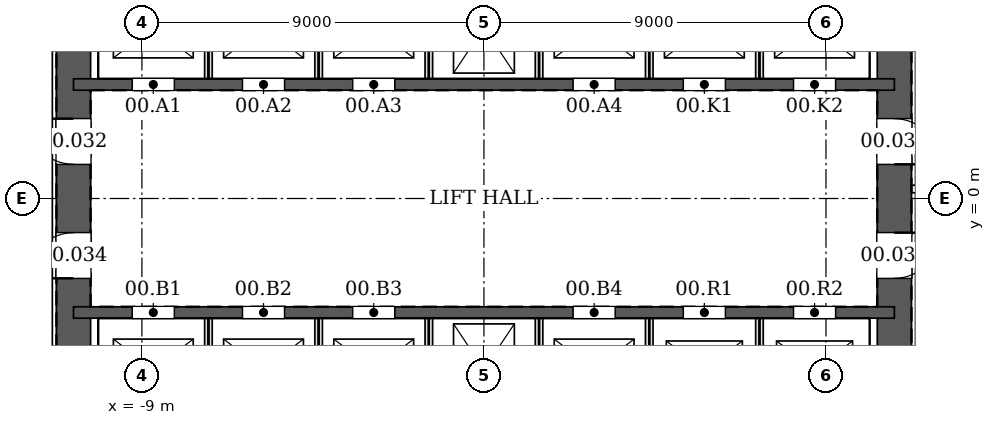
"""IFC4 building model, lengths in metres.
Left out: names, types, materials, properties, quantities, classifications, styles, units other than length and angle.
Written with IfcOpenShell. Run it as: python <this file> out.ifc"""

import sys

from ifc_helpers import new_model, si_unit, direction, frame, frame_2d, origin, place, context, subcontext, project, spatial, rectangle, extrude, element, fill, save


model = new_model("IFC4")
c1 = context("Model", 3, precision=1e-05, world=origin(), true_north=direction((0.0, 1.0)))
c2 = subcontext(c1, "Body", "Model", "MODEL_VIEW")
j1 = project(units=[si_unit("LENGTHUNIT", "METRE"), si_unit("PLANEANGLEUNIT", "RADIAN")], contexts=[c1])
p1 = place(None, origin())
s1 = spatial("IfcSite", under=j1, at=p1, CompositionType="ELEMENT")
p2 = place(p1, origin())
s2 = spatial("IfcBuilding", under=s1, at=p2, CompositionType="ELEMENT")
p3 = place(p2, origin())
s3 = spatial("IfcBuildingStorey", under=s2, at=p3, CompositionType="ELEMENT", Elevation=0.0)
p4 = place(p3, frame((10.8, -10.8, 0.0), z_axis=(0.0, 0.0, 1.0), x_axis=(0.0, 1.0, 0.0)))
e1 = element("IfcWall", 1, at=p4, inside=s3, PredefinedType="SOLIDWALL", context=c2, shape_type="SweptSolid", body=[
    extrude(rectangle(XDim=21.6, YDim=0.9, at=frame_2d((10.8, 0.0))), origin(), (0.0, 0.0, 1.0), 7.2),
])
p5 = place(p4, frame((11.7, 0.0, 0.0)))
e2 = element("IfcOpeningElement", 2, at=p5, cuts=e1, PredefinedType="OPENING", context=c2, shape_type="SweptSolid", body=[
    extrude(rectangle(XDim=1.2, YDim=2.1, at=frame_2d((0.6, 1.05))), frame((0.0, 0.46, 0.0), z_axis=(0.0, -1.0, 0.0), x_axis=(1.0, 0.0, 0.0)), (0.0, 0.0, 1.0), 0.92),
])
p6 = place(p4, frame((8.7, 0.0, 0.0)))
e3 = element("IfcOpeningElement", 3, at=p6, cuts=e1, PredefinedType="OPENING", context=c2, shape_type="SweptSolid", body=[
    extrude(rectangle(XDim=1.2, YDim=2.1, at=frame_2d((0.6, 1.05))), frame((0.0, 0.46, 0.0), z_axis=(0.0, -1.0, 0.0), x_axis=(1.0, 0.0, 0.0)), (0.0, 0.0, 1.0), 0.92),
])
p7 = place(p3, frame((-10.8, 10.8, 0.0), z_axis=(0.0, 0.0, 1.0), x_axis=(0.0, -1.0, 0.0)))
e4 = element("IfcWall", 4, at=p7, inside=s3, PredefinedType="SOLIDWALL", context=c2, shape_type="SweptSolid", body=[
    extrude(rectangle(XDim=21.6, YDim=0.9, at=frame_2d((10.8, 0.0))), origin(), (0.0, 0.0, 1.0), 7.2),
])
p8 = place(p7, frame((8.7, 0.0, 0.0)))
e5 = element("IfcOpeningElement", 5, at=p8, cuts=e4, PredefinedType="OPENING", context=c2, shape_type="SweptSolid", body=[
    extrude(rectangle(XDim=1.2, YDim=2.1, at=frame_2d((0.6, 1.05))), frame((0.0, 0.46, 0.0), z_axis=(0.0, -1.0, 0.0), x_axis=(1.0, 0.0, 0.0)), (0.0, 0.0, 1.0), 0.92),
])
p9 = place(p7, frame((11.7, 0.0, 0.0)))
e6 = element("IfcOpeningElement", 6, at=p9, cuts=e4, PredefinedType="OPENING", context=c2, shape_type="SweptSolid", body=[
    extrude(rectangle(XDim=1.2, YDim=2.1, at=frame_2d((0.6, 1.05))), frame((0.0, 0.46, 0.0), z_axis=(0.0, -1.0, 0.0), x_axis=(1.0, 0.0, 0.0)), (0.0, 0.0, 1.0), 0.92),
])
p10 = place(p3, frame((-10.8, 3.0, 0.0), z_axis=(0.0, 0.0, 1.0), x_axis=(1.0, 0.0, 0.0)))
e7 = element("IfcWall", 7, at=p10, inside=s3, PredefinedType="SOLIDWALL", context=c2, shape_type="SweptSolid", body=[
    extrude(rectangle(XDim=21.6, YDim=0.3, at=frame_2d((10.8, 0.0))), origin(), (0.0, 0.0, 1.0), 7.2),
])
p11 = place(p10, frame((1.55, 0.0, 0.0)))
e8 = element("IfcOpeningElement", 8, at=p11, cuts=e7, PredefinedType="OPENING", context=c2, shape_type="SweptSolid", body=[
    extrude(rectangle(XDim=1.1, YDim=2.1, at=frame_2d((0.55, 1.05))), frame((0.0, 0.16, 0.0), z_axis=(0.0, -1.0, 0.0), x_axis=(1.0, 0.0, 0.0)), (0.0, 0.0, 1.0), 0.32),
])
p12 = place(p10, frame((4.45, 0.0, 0.0)))
e9 = element("IfcOpeningElement", 9, at=p12, cuts=e7, PredefinedType="OPENING", context=c2, shape_type="SweptSolid", body=[
    extrude(rectangle(XDim=1.1, YDim=2.1, at=frame_2d((0.55, 1.05))), frame((0.0, 0.16, 0.0), z_axis=(0.0, -1.0, 0.0), x_axis=(1.0, 0.0, 0.0)), (0.0, 0.0, 1.0), 0.32),
])
p13 = place(p10, frame((7.35, 0.0, 0.0)))
e10 = element("IfcOpeningElement", 10, at=p13, cuts=e7, PredefinedType="OPENING", context=c2, shape_type="SweptSolid", body=[
    extrude(rectangle(XDim=1.1, YDim=2.1, at=frame_2d((0.55, 1.05))), frame((0.0, 0.16, 0.0), z_axis=(0.0, -1.0, 0.0), x_axis=(1.0, 0.0, 0.0)), (0.0, 0.0, 1.0), 0.32),
])
p14 = place(p10, frame((13.15, 0.0, 0.0)))
e11 = element("IfcOpeningElement", 11, at=p14, cuts=e7, PredefinedType="OPENING", context=c2, shape_type="SweptSolid", body=[
    extrude(rectangle(XDim=1.1, YDim=2.1, at=frame_2d((0.55, 1.05))), frame((0.0, 0.16, 0.0), z_axis=(0.0, -1.0, 0.0), x_axis=(1.0, 0.0, 0.0)), (0.0, 0.0, 1.0), 0.32),
])
p15 = place(p10, frame((16.05, 0.0, 0.0)))
e12 = element("IfcOpeningElement", 12, at=p15, cuts=e7, PredefinedType="OPENING", context=c2, shape_type="SweptSolid", body=[
    extrude(rectangle(XDim=1.1, YDim=2.1, at=frame_2d((0.55, 1.05))), frame((0.0, 0.16, 0.0), z_axis=(0.0, -1.0, 0.0), x_axis=(1.0, 0.0, 0.0)), (0.0, 0.0, 1.0), 0.32),
])
p16 = place(p10, frame((18.95, 0.0, 0.0)))
e13 = element("IfcOpeningElement", 13, at=p16, cuts=e7, PredefinedType="OPENING", context=c2, shape_type="SweptSolid", body=[
    extrude(rectangle(XDim=1.1, YDim=2.1, at=frame_2d((0.55, 1.05))), frame((0.0, 0.16, 0.0), z_axis=(0.0, -1.0, 0.0), x_axis=(1.0, 0.0, 0.0)), (0.0, 0.0, 1.0), 0.32),
])
p17 = place(p3, frame((-10.8, -3.0, 0.0), z_axis=(0.0, 0.0, 1.0), x_axis=(1.0, 0.0, 0.0)))
e14 = element("IfcWall", 14, at=p17, inside=s3, PredefinedType="SOLIDWALL", context=c2, shape_type="SweptSolid", body=[
    extrude(rectangle(XDim=21.6, YDim=0.3, at=frame_2d((10.8, 0.0))), origin(), (0.0, 0.0, 1.0), 7.2),
])
p18 = place(p17, frame((1.55, 0.0, 0.0)))
e15 = element("IfcOpeningElement", 15, at=p18, cuts=e14, PredefinedType="OPENING", context=c2, shape_type="SweptSolid", body=[
    extrude(rectangle(XDim=1.1, YDim=2.1, at=frame_2d((0.55, 1.05))), frame((0.0, 0.16, 0.0), z_axis=(0.0, -1.0, 0.0), x_axis=(1.0, 0.0, 0.0)), (0.0, 0.0, 1.0), 0.32),
])
p19 = place(p17, frame((4.45, 0.0, 0.0)))
e16 = element("IfcOpeningElement", 16, at=p19, cuts=e14, PredefinedType="OPENING", context=c2, shape_type="SweptSolid", body=[
    extrude(rectangle(XDim=1.1, YDim=2.1, at=frame_2d((0.55, 1.05))), frame((0.0, 0.16, 0.0), z_axis=(0.0, -1.0, 0.0), x_axis=(1.0, 0.0, 0.0)), (0.0, 0.0, 1.0), 0.32),
])
p20 = place(p17, frame((7.35, 0.0, 0.0)))
e17 = element("IfcOpeningElement", 17, at=p20, cuts=e14, PredefinedType="OPENING", context=c2, shape_type="SweptSolid", body=[
    extrude(rectangle(XDim=1.1, YDim=2.1, at=frame_2d((0.55, 1.05))), frame((0.0, 0.16, 0.0), z_axis=(0.0, -1.0, 0.0), x_axis=(1.0, 0.0, 0.0)), (0.0, 0.0, 1.0), 0.32),
])
p21 = place(p17, frame((13.15, 0.0, 0.0)))
e18 = element("IfcOpeningElement", 18, at=p21, cuts=e14, PredefinedType="OPENING", context=c2, shape_type="SweptSolid", body=[
    extrude(rectangle(XDim=1.1, YDim=2.1, at=frame_2d((0.55, 1.05))), frame((0.0, 0.16, 0.0), z_axis=(0.0, -1.0, 0.0), x_axis=(1.0, 0.0, 0.0)), (0.0, 0.0, 1.0), 0.32),
])
p22 = place(p17, frame((16.05, 0.0, 0.0)))
e19 = element("IfcOpeningElement", 19, at=p22, cuts=e14, PredefinedType="OPENING", context=c2, shape_type="SweptSolid", body=[
    extrude(rectangle(XDim=1.1, YDim=2.1, at=frame_2d((0.55, 1.05))), frame((0.0, 0.16, 0.0), z_axis=(0.0, -1.0, 0.0), x_axis=(1.0, 0.0, 0.0)), (0.0, 0.0, 1.0), 0.32),
])
p23 = place(p17, frame((18.95, 0.0, 0.0)))
e20 = element("IfcOpeningElement", 20, at=p23, cuts=e14, PredefinedType="OPENING", context=c2, shape_type="SweptSolid", body=[
    extrude(rectangle(XDim=1.1, YDim=2.1, at=frame_2d((0.55, 1.05))), frame((0.0, 0.16, 0.0), z_axis=(0.0, -1.0, 0.0), x_axis=(1.0, 0.0, 0.0)), (0.0, 0.0, 1.0), 0.32),
])
p24 = place(p3, frame((11.25, 0.25, 0.0), z_axis=(0.0, 0.0, 1.0), x_axis=(1.0, 0.0, 0.0)))
e21 = element("IfcWall", 21, at=p24, inside=s3, PredefinedType="PARTITIONING", context=c2, shape_type="SweptSolid", body=[
    extrude(rectangle(XDim=3.25, YDim=0.2, at=frame_2d((1.625, 0.0))), origin(), (0.0, 0.0, 1.0), 5.59),
])
p25 = place(p24, frame((0.725, 0.0, 0.0)))
e22 = element("IfcOpeningElement", 22, at=p25, cuts=e21, PredefinedType="OPENING", context=c2, shape_type="SweptSolid", body=[
    extrude(rectangle(XDim=1.8, YDim=2.4, at=frame_2d((0.9, 1.2))), frame((0.0, 0.11, 0.0), z_axis=(0.0, -1.0, 0.0), x_axis=(1.0, 0.0, 0.0)), (0.0, 0.0, 1.0), 0.22),
])
for number, where, z_axis, x_axis in (
    (23, (-7.25, 3.15, 0.0), (0.0, 0.0, 1.0), (0.0, 1.0, 0.0)),
    (24, (-4.35, 3.15, 0.0), (0.0, 0.0, 1.0), (0.0, 1.0, 0.0)),
    (25, (-1.45, 3.15, 0.0), (0.0, 0.0, 1.0), (0.0, 1.0, 0.0)),
    (26, (1.45, 3.15, 0.0), (0.0, 0.0, 1.0), (0.0, 1.0, 0.0)),
    (27, (4.35, 3.15, 0.0), (0.0, 0.0, 1.0), (0.0, 1.0, 0.0)),
    (28, (7.25, 3.15, 0.0), (0.0, 0.0, 1.0), (0.0, 1.0, 0.0)),
    (29, (-7.25, -5.85, 0.0), (0.0, 0.0, 1.0), (0.0, 1.0, 0.0)),
    (30, (-4.35, -5.85, 0.0), (0.0, 0.0, 1.0), (0.0, 1.0, 0.0)),
    (31, (-1.45, -5.85, 0.0), (0.0, 0.0, 1.0), (0.0, 1.0, 0.0)),
    (32, (1.45, -5.85, 0.0), (0.0, 0.0, 1.0), (0.0, 1.0, 0.0)),
    (33, (4.35, -5.85, 0.0), (0.0, 0.0, 1.0), (0.0, 1.0, 0.0)),
    (34, (7.25, -5.85, 0.0), (0.0, 0.0, 1.0), (0.0, 1.0, 0.0)),
):
    element("IfcWall", number, at=place(p3, frame(where, z_axis=z_axis, x_axis=x_axis)), inside=s3, PredefinedType="PARTITIONING", context=c2, shape_type="SweptSolid", body=[
        extrude(rectangle(XDim=2.7, YDim=0.2, at=frame_2d((1.35, 0.0))), origin(), (0.0, 0.0, 1.0), 7.2),
    ])
p26 = place(p5, frame((1.2, 0.0, 0.0), z_axis=(0.0, 0.0, 1.0), x_axis=(-1.0, 0.0, 0.0)))
e35 = element("IfcDoor", 35, at=p26, inside=s3, OperationType="SINGLE_SWING_RIGHT", PredefinedType="DOOR", context=c2, shape_type="SweptSolid", body=[
    extrude(rectangle(XDim=1.2, YDim=2.1, at=frame_2d((0.6, 1.05))), frame((0.0, 0.025, 0.0), z_axis=(0.0, -1.0, 0.0), x_axis=(1.0, 0.0, 0.0)), (0.0, 0.0, 1.0), 0.05),
])
fill(e2, e35)
p27 = place(p8, frame((1.2, 0.0, 0.0), z_axis=(0.0, 0.0, 1.0), x_axis=(-1.0, 0.0, 0.0)))
e36 = element("IfcDoor", 36, at=p27, inside=s3, OperationType="SINGLE_SWING_RIGHT", PredefinedType="DOOR", context=c2, shape_type="SweptSolid", body=[
    extrude(rectangle(XDim=1.2, YDim=2.1, at=frame_2d((0.6, 1.05))), frame((0.0, 0.025, 0.0), z_axis=(0.0, -1.0, 0.0), x_axis=(1.0, 0.0, 0.0)), (0.0, 0.0, 1.0), 0.05),
])
fill(e5, e36)
p28 = place(p6, frame((1.2, 0.0, 0.0), z_axis=(0.0, 0.0, 1.0), x_axis=(-1.0, 0.0, 0.0)))
e37 = element("IfcDoor", 37, at=p28, inside=s3, OperationType="SINGLE_SWING_LEFT", PredefinedType="DOOR", context=c2, shape_type="SweptSolid", body=[
    extrude(rectangle(XDim=1.2, YDim=2.1, at=frame_2d((0.6, 1.05))), frame((0.0, 0.025, 0.0), z_axis=(0.0, -1.0, 0.0), x_axis=(1.0, 0.0, 0.0)), (0.0, 0.0, 1.0), 0.05),
])
fill(e3, e37)
p29 = place(p9, frame((1.2, 0.0, 0.0), z_axis=(0.0, 0.0, 1.0), x_axis=(-1.0, 0.0, 0.0)))
e38 = element("IfcDoor", 38, at=p29, inside=s3, OperationType="SINGLE_SWING_LEFT", PredefinedType="DOOR", context=c2, shape_type="SweptSolid", body=[
    extrude(rectangle(XDim=1.2, YDim=2.1, at=frame_2d((0.6, 1.05))), frame((0.0, 0.025, 0.0), z_axis=(0.0, -1.0, 0.0), x_axis=(1.0, 0.0, 0.0)), (0.0, 0.0, 1.0), 0.05),
])
fill(e6, e38)
p30 = place(p11, origin())
e39 = element("IfcDoor", 39, at=p30, inside=s3, OperationType="DOUBLE_DOOR_SLIDING", PredefinedType="DOOR", context=c2, shape_type="SweptSolid", body=[
    extrude(rectangle(XDim=1.1, YDim=2.1, at=frame_2d((0.55, 1.05))), frame((0.0, 0.025, 0.0), z_axis=(0.0, -1.0, 0.0), x_axis=(1.0, 0.0, 0.0)), (0.0, 0.0, 1.0), 0.05),
])
fill(e8, e39)
p31 = place(p12, origin())
e40 = element("IfcDoor", 40, at=p31, inside=s3, OperationType="DOUBLE_DOOR_SLIDING", PredefinedType="DOOR", context=c2, shape_type="SweptSolid", body=[
    extrude(rectangle(XDim=1.1, YDim=2.1, at=frame_2d((0.55, 1.05))), frame((0.0, 0.025, 0.0), z_axis=(0.0, -1.0, 0.0), x_axis=(1.0, 0.0, 0.0)), (0.0, 0.0, 1.0), 0.05),
])
fill(e9, e40)
p32 = place(p13, origin())
e41 = element("IfcDoor", 41, at=p32, inside=s3, OperationType="DOUBLE_DOOR_SLIDING", PredefinedType="DOOR", context=c2, shape_type="SweptSolid", body=[
    extrude(rectangle(XDim=1.1, YDim=2.1, at=frame_2d((0.55, 1.05))), frame((0.0, 0.025, 0.0), z_axis=(0.0, -1.0, 0.0), x_axis=(1.0, 0.0, 0.0)), (0.0, 0.0, 1.0), 0.05),
])
fill(e10, e41)
p33 = place(p14, origin())
e42 = element("IfcDoor", 42, at=p33, inside=s3, OperationType="DOUBLE_DOOR_SLIDING", PredefinedType="DOOR", context=c2, shape_type="SweptSolid", body=[
    extrude(rectangle(XDim=1.1, YDim=2.1, at=frame_2d((0.55, 1.05))), frame((0.0, 0.025, 0.0), z_axis=(0.0, -1.0, 0.0), x_axis=(1.0, 0.0, 0.0)), (0.0, 0.0, 1.0), 0.05),
])
fill(e11, e42)
p34 = place(p15, origin())
e43 = element("IfcDoor", 43, at=p34, inside=s3, OperationType="DOUBLE_DOOR_SLIDING", PredefinedType="DOOR", context=c2, shape_type="SweptSolid", body=[
    extrude(rectangle(XDim=1.1, YDim=2.1, at=frame_2d((0.55, 1.05))), frame((0.0, 0.025, 0.0), z_axis=(0.0, -1.0, 0.0), x_axis=(1.0, 0.0, 0.0)), (0.0, 0.0, 1.0), 0.05),
])
fill(e12, e43)
p35 = place(p16, origin())
e44 = element("IfcDoor", 44, at=p35, inside=s3, OperationType="DOUBLE_DOOR_SLIDING", PredefinedType="DOOR", context=c2, shape_type="SweptSolid", body=[
    extrude(rectangle(XDim=1.1, YDim=2.1, at=frame_2d((0.55, 1.05))), frame((0.0, 0.025, 0.0), z_axis=(0.0, -1.0, 0.0), x_axis=(1.0, 0.0, 0.0)), (0.0, 0.0, 1.0), 0.05),
])
fill(e13, e44)
p36 = place(p18, origin())
e45 = element("IfcDoor", 45, at=p36, inside=s3, OperationType="DOUBLE_DOOR_SLIDING", PredefinedType="DOOR", context=c2, shape_type="SweptSolid", body=[
    extrude(rectangle(XDim=1.1, YDim=2.1, at=frame_2d((0.55, 1.05))), frame((0.0, 0.025, 0.0), z_axis=(0.0, -1.0, 0.0), x_axis=(1.0, 0.0, 0.0)), (0.0, 0.0, 1.0), 0.05),
])
fill(e15, e45)
p37 = place(p19, origin())
e46 = element("IfcDoor", 46, at=p37, inside=s3, OperationType="DOUBLE_DOOR_SLIDING", PredefinedType="DOOR", context=c2, shape_type="SweptSolid", body=[
    extrude(rectangle(XDim=1.1, YDim=2.1, at=frame_2d((0.55, 1.05))), frame((0.0, 0.025, 0.0), z_axis=(0.0, -1.0, 0.0), x_axis=(1.0, 0.0, 0.0)), (0.0, 0.0, 1.0), 0.05),
])
fill(e16, e46)
p38 = place(p20, origin())
e47 = element("IfcDoor", 47, at=p38, inside=s3, OperationType="DOUBLE_DOOR_SLIDING", PredefinedType="DOOR", context=c2, shape_type="SweptSolid", body=[
    extrude(rectangle(XDim=1.1, YDim=2.1, at=frame_2d((0.55, 1.05))), frame((0.0, 0.025, 0.0), z_axis=(0.0, -1.0, 0.0), x_axis=(1.0, 0.0, 0.0)), (0.0, 0.0, 1.0), 0.05),
])
fill(e17, e47)
p39 = place(p21, origin())
e48 = element("IfcDoor", 48, at=p39, inside=s3, OperationType="DOUBLE_DOOR_SLIDING", PredefinedType="DOOR", context=c2, shape_type="SweptSolid", body=[
    extrude(rectangle(XDim=1.1, YDim=2.1, at=frame_2d((0.55, 1.05))), frame((0.0, 0.025, 0.0), z_axis=(0.0, -1.0, 0.0), x_axis=(1.0, 0.0, 0.0)), (0.0, 0.0, 1.0), 0.05),
])
fill(e18, e48)
p40 = place(p22, origin())
e49 = element("IfcDoor", 49, at=p40, inside=s3, OperationType="DOUBLE_DOOR_SLIDING", PredefinedType="DOOR", context=c2, shape_type="SweptSolid", body=[
    extrude(rectangle(XDim=1.1, YDim=2.1, at=frame_2d((0.55, 1.05))), frame((0.0, 0.025, 0.0), z_axis=(0.0, -1.0, 0.0), x_axis=(1.0, 0.0, 0.0)), (0.0, 0.0, 1.0), 0.05),
])
fill(e19, e49)
p41 = place(p23, origin())
e50 = element("IfcDoor", 50, at=p41, inside=s3, OperationType="DOUBLE_DOOR_SLIDING", PredefinedType="DOOR", context=c2, shape_type="SweptSolid", body=[
    extrude(rectangle(XDim=1.1, YDim=2.1, at=frame_2d((0.55, 1.05))), frame((0.0, 0.025, 0.0), z_axis=(0.0, -1.0, 0.0), x_axis=(1.0, 0.0, 0.0)), (0.0, 0.0, 1.0), 0.05),
])
fill(e20, e50)
save(model, sys.argv[1])
